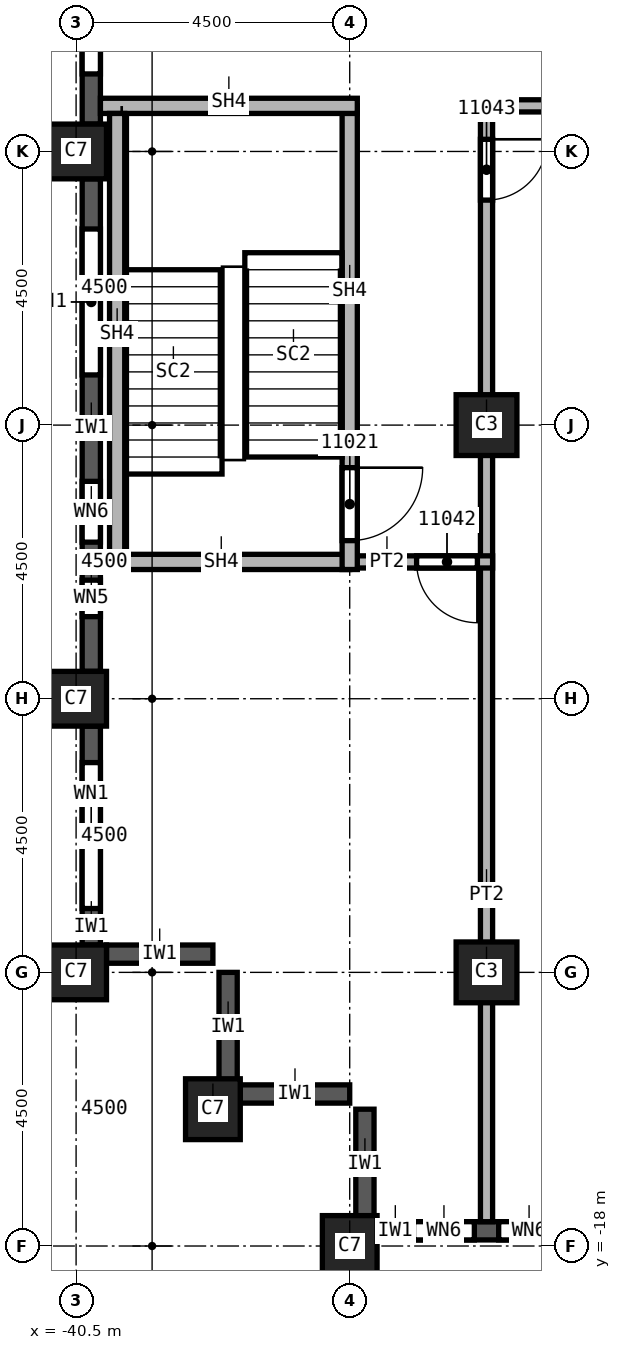
"""IFC4 building model, lengths in metres.
Left out: names, types, materials, properties, quantities, classifications, styles, units other than length and angle.
Written with IfcOpenShell. Run it as: python <this file> out.ifc"""

import sys

from ifc_helpers import new_model, si_unit, direction, frame, frame_2d, origin, origin_2d, place, context, subcontext, project, spatial, rectangle, extrude, element, fill, save


model = new_model("IFC4")
c1 = context("Model", 3, precision=1e-05, world=origin(), true_north=direction((0.0, 1.0)))
c2 = subcontext(c1, "Body", "Model", "MODEL_VIEW")
j1 = project(units=[si_unit("LENGTHUNIT", "METRE"), si_unit("PLANEANGLEUNIT", "RADIAN")], contexts=[c1])
p1 = place(None, origin())
s1 = spatial("IfcSite", under=j1, at=p1, CompositionType="ELEMENT")
p2 = place(p1, origin())
s2 = spatial("IfcBuilding", under=s1, at=p2, CompositionType="ELEMENT")
p3 = place(p2, frame((0.0, 0.0, 184.0)))
s3 = spatial("IfcBuildingStorey", under=s2, at=p3, CompositionType="ELEMENT", Elevation=184.0)
for number, where, z_axis, x_axis in (
    (1, (-40.5, 0.0, 0.0), (0.0, 0.0, 1.0), (0.0, 1.0, 0.0)),
    (2, (-40.5, -9.0, 0.0), (0.0, 0.0, 1.0), (0.0, 1.0, 0.0)),
    (3, (-40.5, -13.5, 0.0), (0.0, 0.0, 1.0), (0.0, 1.0, 0.0)),
    (4, (-38.25, -15.75, 0.0), (0.0, 0.0, 1.0), (1.0, 0.0, 0.0)),
    (5, (-36.0, -18.0, 0.0), (0.0, 0.0, 1.0), (1.0, 0.0, 0.0)),
):
    element("IfcColumn", number, at=place(p3, frame(where, z_axis=z_axis, x_axis=x_axis)), inside=s3, PredefinedType="COLUMN", context=c2, shape_type="SweptSolid", body=[
        extrude(rectangle(XDim=0.9, YDim=1.0, at=origin_2d()), origin(), (0.0, 0.0, 1.0), 3.72),
    ])
for number, where, z_axis, x_axis in (
    (6, (-33.75, -4.5, 0.0), (0.0, 0.0, 1.0), (1.0, 0.0, 0.0)),
    (7, (-33.75, -13.5, 0.0), (0.0, 0.0, 1.0), (1.0, 0.0, 0.0)),
):
    element("IfcColumn", number, at=place(p3, frame(where, z_axis=z_axis, x_axis=x_axis)), inside=s3, PredefinedType="COLUMN", context=c2, shape_type="SweptSolid", body=[
        extrude(rectangle(XDim=1.0, YDim=1.0, at=origin_2d()), origin(), (0.0, 0.0, 1.0), 3.72),
    ])
p4 = place(p3, frame((-40.0, -13.2, 0.0), z_axis=(0.0, 0.0, 1.0), x_axis=(1.0, 0.0, 0.0)))
e8 = element("IfcWall", 8, at=p4, inside=s3, PredefinedType="SOLIDWALL", context=c2, shape_type="SweptSolid", body=[
    extrude(rectangle(XDim=1.75, YDim=0.3, at=frame_2d((0.875, 0.0))), origin(), (0.0, 0.0, 1.0), 3.12),
])
for number, where, z_axis, x_axis in (
    (9, (-38.0, -15.3, 0.0), (0.0, 0.0, 1.0), (0.0, 1.0, 0.0)),
    (10, (-37.8, -15.5, 0.0), (0.0, 0.0, 1.0), (1.0, 0.0, 0.0)),
    (11, (-35.75, -17.55, 0.0), (0.0, 0.0, 1.0), (0.0, 1.0, 0.0)),
):
    element("IfcWall", number, at=place(p3, frame(where, z_axis=z_axis, x_axis=x_axis)), inside=s3, PredefinedType="SOLIDWALL", context=c2, shape_type="SweptSolid", body=[
        extrude(rectangle(XDim=1.8, YDim=0.3, at=frame_2d((0.9, 0.0))), origin(), (0.0, 0.0, 1.0), 3.12),
    ])
p5 = place(p3, frame((-40.25, 8.55, 0.0), z_axis=(0.0, 0.0, 1.0), x_axis=(0.0, -1.0, 0.0)))
e12 = element("IfcWall", 12, at=p5, inside=s3, PredefinedType="SOLIDWALL", context=c2, shape_type="SweptSolid", body=[
    extrude(rectangle(XDim=8.1, YDim=0.3, at=frame_2d((4.05, 0.0))), origin(), (0.0, 0.0, 1.0), 3.12),
])
p6 = place(p5, frame((0.825, 0.0, 0.8)))
e13 = element("IfcOpeningElement", 13, at=p6, cuts=e12, PredefinedType="OPENING", context=c2, shape_type="SweptSolid", body=[
    extrude(rectangle(XDim=2.4, YDim=1.95, at=frame_2d((1.2, 0.975))), frame((0.0, 0.15, 0.0), z_axis=(0.0, -1.0, 0.0), x_axis=(1.0, 0.0, 0.0)), (0.0, 0.0, 1.0), 0.3),
])
p7 = place(p5, frame((4.875, 0.0, 0.8)))
e14 = element("IfcOpeningElement", 14, at=p7, cuts=e12, PredefinedType="OPENING", context=c2, shape_type="SweptSolid", body=[
    extrude(rectangle(XDim=2.4, YDim=1.95, at=frame_2d((1.2, 0.975))), frame((0.0, 0.15, 0.0), z_axis=(0.0, -1.0, 0.0), x_axis=(1.0, 0.0, 0.0)), (0.0, 0.0, 1.0), 0.3),
])
p8 = place(p3, frame((-40.25, -0.45, 0.0), z_axis=(0.0, 0.0, 1.0), x_axis=(0.0, -1.0, 0.0)))
e15 = element("IfcWall", 15, at=p8, inside=s3, PredefinedType="SOLIDWALL", context=c2, shape_type="SweptSolid", body=[
    extrude(rectangle(XDim=8.1, YDim=0.3, at=frame_2d((4.05, 0.0))), origin(), (0.0, 0.0, 1.0), 3.12),
])
p9 = place(p8, frame((0.825, 0.0, 0.8)))
e16 = element("IfcOpeningElement", 16, at=p9, cuts=e15, PredefinedType="OPENING", context=c2, shape_type="SweptSolid", body=[
    extrude(rectangle(XDim=2.4, YDim=1.95, at=frame_2d((1.2, 0.975))), frame((0.0, 0.15, 0.0), z_axis=(0.0, -1.0, 0.0), x_axis=(1.0, 0.0, 0.0)), (0.0, 0.0, 1.0), 0.3),
])
p10 = place(p8, frame((4.975, 0.0, 0.8)))
e17 = element("IfcOpeningElement", 17, at=p10, cuts=e15, PredefinedType="OPENING", context=c2, shape_type="SweptSolid", body=[
    extrude(rectangle(XDim=1.0, YDim=1.95, at=frame_2d((0.5, 0.975))), frame((0.0, 0.15, 0.0), z_axis=(0.0, -1.0, 0.0), x_axis=(1.0, 0.0, 0.0)), (0.0, 0.0, 1.0), 0.3),
])
p11 = place(p8, frame((6.6, 0.0, 0.8)))
e18 = element("IfcOpeningElement", 18, at=p11, cuts=e15, PredefinedType="OPENING", context=c2, shape_type="SweptSolid", body=[
    extrude(rectangle(XDim=0.6, YDim=1.95, at=frame_2d((0.3, 0.975))), frame((0.0, 0.15, 0.0), z_axis=(0.0, -1.0, 0.0), x_axis=(1.0, 0.0, 0.0)), (0.0, 0.0, 1.0), 0.3),
])
p12 = place(p3, frame((-40.25, -9.45, 0.0), z_axis=(0.0, 0.0, 1.0), x_axis=(0.0, -1.0, 0.0)))
e19 = element("IfcWall", 19, at=p12, inside=s3, PredefinedType="SOLIDWALL", context=c2, shape_type="SweptSolid", body=[
    extrude(rectangle(XDim=3.6, YDim=0.3, at=frame_2d((1.8, 0.0))), origin(), (0.0, 0.0, 1.0), 3.12),
])
p13 = place(p12, frame((0.6, 0.0, 0.8)))
e20 = element("IfcOpeningElement", 20, at=p13, cuts=e19, PredefinedType="OPENING", context=c2, shape_type="SweptSolid", body=[
    extrude(rectangle(XDim=2.4, YDim=1.95, at=frame_2d((1.2, 0.975))), frame((0.0, 0.15, 0.0), z_axis=(0.0, -1.0, 0.0), x_axis=(1.0, 0.0, 0.0)), (0.0, 0.0, 1.0), 0.3),
])
p14 = place(p3, frame((-35.55, -17.75, 0.0), z_axis=(0.0, 0.0, 1.0), x_axis=(1.0, 0.0, 0.0)))
e21 = element("IfcWall", 21, at=p14, inside=s3, PredefinedType="SOLIDWALL", context=c2, shape_type="SweptSolid", body=[
    extrude(rectangle(XDim=3.6, YDim=0.3, at=frame_2d((1.8, 0.0))), origin(), (0.0, 0.0, 1.0), 3.12),
])
p15 = place(p14, frame((0.6, 0.0, 0.8)))
e22 = element("IfcOpeningElement", 22, at=p15, cuts=e21, PredefinedType="OPENING", context=c2, shape_type="SweptSolid", body=[
    extrude(rectangle(XDim=1.0, YDim=1.95, at=frame_2d((0.5, 0.975))), frame((0.0, 0.15, 0.0), z_axis=(0.0, -1.0, 0.0), x_axis=(1.0, 0.0, 0.0)), (0.0, 0.0, 1.0), 0.3),
])
p16 = place(p14, frame((2.0, 0.0, 0.8)))
e23 = element("IfcOpeningElement", 23, at=p16, cuts=e21, PredefinedType="OPENING", context=c2, shape_type="SweptSolid", body=[
    extrude(rectangle(XDim=1.0, YDim=1.95, at=frame_2d((0.5, 0.975))), frame((0.0, 0.15, 0.0), z_axis=(0.0, -1.0, 0.0), x_axis=(1.0, 0.0, 0.0)), (0.0, 0.0, 1.0), 0.3),
])
p17 = place(p3, frame((-33.75, 0.75, 0.0), z_axis=(0.0, 0.0, 1.0), x_axis=(0.0, -1.0, 0.0)))
e24 = element("IfcWall", 24, at=p17, inside=s3, PredefinedType="PARTITIONING", context=c2, shape_type="SweptSolid", body=[
    extrude(rectangle(XDim=18.35, YDim=0.2, at=frame_2d((9.175, 0.0))), origin(), (0.0, 0.0, 1.0), 3.72),
])
p18 = place(p17, frame((0.55, 0.0, 0.0)))
e25 = element("IfcOpeningElement", 25, at=p18, cuts=e24, PredefinedType="OPENING", context=c2, shape_type="SweptSolid", body=[
    extrude(rectangle(XDim=1.0, YDim=2.1, at=frame_2d((0.5, 1.05))), frame((0.0, 0.1, 0.0), z_axis=(0.0, -1.0, 0.0), x_axis=(1.0, 0.0, 0.0)), (0.0, 0.0, 1.0), 0.2),
])
p19 = place(p3, frame((-33.65, -6.75, 0.0), z_axis=(0.0, 0.0, 1.0), x_axis=(-1.0, 0.0, 0.0)))
e26 = element("IfcWall", 26, at=p19, inside=s3, PredefinedType="PARTITIONING", context=c2, shape_type="SweptSolid", body=[
    extrude(rectangle(XDim=2.35, YDim=0.2, at=frame_2d((1.175, 0.0))), origin(), (0.0, 0.0, 1.0), 3.72),
])
p20 = place(p19, frame((0.25, 0.0, 0.0)))
e27 = element("IfcOpeningElement", 27, at=p20, cuts=e26, PredefinedType="OPENING", context=c2, shape_type="SweptSolid", body=[
    extrude(rectangle(XDim=1.0, YDim=2.1, at=frame_2d((0.5, 1.05))), frame((0.0, 0.1, 0.0), z_axis=(0.0, -1.0, 0.0), x_axis=(1.0, 0.0, 0.0)), (0.0, 0.0, 1.0), 0.2),
])
p21 = place(p3, frame((-19.9, 0.75, 0.0), z_axis=(0.0, 0.0, 1.0), x_axis=(-1.0, 0.0, 0.0)))
e28 = element("IfcWall", 28, at=p21, inside=s3, PredefinedType="PARTITIONING", context=c2, shape_type="SweptSolid", body=[
    extrude(rectangle(XDim=13.95, YDim=0.2, at=frame_2d((6.975, 0.0))), origin(), (0.0, 0.0, 1.0), 3.72),
])
p22 = place(p3, frame((-36.0, -6.75, 0.0), z_axis=(0.0, 0.0, 1.0), x_axis=(-1.0, 0.0, 0.0)))
e29 = element("IfcWall", 29, at=p22, inside=s3, PredefinedType="SOLIDWALL", context=c2, shape_type="SweptSolid", body=[
    extrude(rectangle(XDim=4.1, YDim=0.25, at=frame_2d((2.05, 0.0))), origin(), (0.0, 0.0, 1.0), 3.72),
])
p23 = place(p3, frame((-36.0, 0.75, 0.0), z_axis=(0.0, 0.0, 1.0), x_axis=(0.0, -1.0, 0.0)))
e30 = element("IfcWall", 30, at=p23, inside=s3, PredefinedType="SOLIDWALL", context=c2, shape_type="SweptSolid", body=[
    extrude(rectangle(XDim=7.625, YDim=0.25, at=frame_2d((3.812, 0.0))), origin(), (0.0, 0.0, 1.0), 3.72),
])
p24 = place(p23, frame((5.95, 0.0, 0.0)))
e31 = element("IfcOpeningElement", 31, at=p24, cuts=e30, PredefinedType="OPENING", context=c2, shape_type="SweptSolid", body=[
    extrude(rectangle(XDim=1.2, YDim=2.1, at=frame_2d((0.6, 1.05))), frame((0.0, 0.125, 0.0), z_axis=(0.0, -1.0, 0.0), x_axis=(1.0, 0.0, 0.0)), (0.0, 0.0, 1.0), 0.25),
])
p25 = place(p3, frame((-35.875, 0.75, 0.0), z_axis=(0.0, 0.0, 1.0), x_axis=(-1.0, 0.0, 0.0)))
e32 = element("IfcWall", 32, at=p25, inside=s3, PredefinedType="SOLIDWALL", context=c2, shape_type="SweptSolid", body=[
    extrude(rectangle(XDim=4.225, YDim=0.25, at=frame_2d((2.113, 0.0))), origin(), (0.0, 0.0, 1.0), 3.72),
])
p26 = place(p3, frame((-39.825, -6.625, 0.0), z_axis=(0.0, 0.0, 1.0), x_axis=(0.0, 1.0, 0.0)))
e33 = element("IfcWall", 33, at=p26, inside=s3, PredefinedType="SOLIDWALL", context=c2, shape_type="SweptSolid", body=[
    extrude(rectangle(XDim=7.25, YDim=0.25, at=frame_2d((3.625, 0.0))), origin(), (0.0, 0.0, 1.0), 3.72),
])
p27 = place(p7, origin())
e34 = element("IfcWindow", 34, at=p27, inside=s3, PartitioningType="SINGLE_PANEL", PredefinedType="WINDOW", context=c2, shape_type="SweptSolid", body=[
    extrude(rectangle(XDim=2.4, YDim=1.95, at=frame_2d((1.2, 0.975))), frame((0.0, 0.03, 0.0), z_axis=(0.0, -1.0, 0.0), x_axis=(1.0, 0.0, 0.0)), (0.0, 0.0, 1.0), 0.06),
])
fill(e14, e34)
p28 = place(p9, origin())
e35 = element("IfcWindow", 35, at=p28, inside=s3, PartitioningType="SINGLE_PANEL", PredefinedType="WINDOW", context=c2, shape_type="SweptSolid", body=[
    extrude(rectangle(XDim=2.4, YDim=1.95, at=frame_2d((1.2, 0.975))), frame((0.0, 0.03, 0.0), z_axis=(0.0, -1.0, 0.0), x_axis=(1.0, 0.0, 0.0)), (0.0, 0.0, 1.0), 0.06),
])
fill(e16, e35)
p29 = place(p13, origin())
e36 = element("IfcWindow", 36, at=p29, inside=s3, PartitioningType="SINGLE_PANEL", PredefinedType="WINDOW", context=c2, shape_type="SweptSolid", body=[
    extrude(rectangle(XDim=2.4, YDim=1.95, at=frame_2d((1.2, 0.975))), frame((0.0, 0.03, 0.0), z_axis=(0.0, -1.0, 0.0), x_axis=(1.0, 0.0, 0.0)), (0.0, 0.0, 1.0), 0.06),
])
fill(e20, e36)
p30 = place(p24, origin())
e37 = element("IfcDoor", 37, at=p30, inside=s3, OperationType="SINGLE_SWING_RIGHT", PredefinedType="DOOR", context=c2, shape_type="SweptSolid", body=[
    extrude(rectangle(XDim=1.2, YDim=2.1, at=frame_2d((0.6, 1.05))), frame((0.0, 0.025, 0.0), z_axis=(0.0, -1.0, 0.0), x_axis=(1.0, 0.0, 0.0)), (0.0, 0.0, 1.0), 0.05),
])
fill(e31, e37)
p31 = place(p20, origin())
e38 = element("IfcDoor", 38, at=p31, inside=s3, OperationType="SINGLE_SWING_LEFT", PredefinedType="DOOR", context=c2, shape_type="SweptSolid", body=[
    extrude(rectangle(XDim=1.0, YDim=2.1, at=frame_2d((0.5, 1.05))), frame((0.0, 0.025, 0.0), z_axis=(0.0, -1.0, 0.0), x_axis=(1.0, 0.0, 0.0)), (0.0, 0.0, 1.0), 0.05),
])
fill(e27, e38)
p32 = place(p18, origin())
e39 = element("IfcDoor", 39, at=p32, inside=s3, OperationType="SINGLE_SWING_RIGHT", PredefinedType="DOOR", context=c2, shape_type="SweptSolid", body=[
    extrude(rectangle(XDim=1.0, YDim=2.1, at=frame_2d((0.5, 1.05))), frame((0.0, 0.025, 0.0), z_axis=(0.0, -1.0, 0.0), x_axis=(1.0, 0.0, 0.0)), (0.0, 0.0, 1.0), 0.05),
])
fill(e25, e39)
p33 = place(p10, origin())
e40 = element("IfcWindow", 40, at=p33, inside=s3, PartitioningType="SINGLE_PANEL", PredefinedType="WINDOW", context=c2, shape_type="SweptSolid", body=[
    extrude(rectangle(XDim=1.0, YDim=1.95, at=frame_2d((0.5, 0.975))), frame((0.0, 0.03, 0.0), z_axis=(0.0, -1.0, 0.0), x_axis=(1.0, 0.0, 0.0)), (0.0, 0.0, 1.0), 0.06),
])
fill(e17, e40)
p34 = place(p11, origin())
e41 = element("IfcWindow", 41, at=p34, inside=s3, PartitioningType="SINGLE_PANEL", PredefinedType="WINDOW", context=c2, shape_type="SweptSolid", body=[
    extrude(rectangle(XDim=0.6, YDim=1.95, at=frame_2d((0.3, 0.975))), frame((0.0, 0.03, 0.0), z_axis=(0.0, -1.0, 0.0), x_axis=(1.0, 0.0, 0.0)), (0.0, 0.0, 1.0), 0.06),
])
fill(e18, e41)
p35 = place(p15, origin())
e42 = element("IfcWindow", 42, at=p35, inside=s3, PartitioningType="SINGLE_PANEL", PredefinedType="WINDOW", context=c2, shape_type="SweptSolid", body=[
    extrude(rectangle(XDim=1.0, YDim=1.95, at=frame_2d((0.5, 0.975))), frame((0.0, 0.03, 0.0), z_axis=(0.0, -1.0, 0.0), x_axis=(1.0, 0.0, 0.0)), (0.0, 0.0, 1.0), 0.06),
])
fill(e22, e42)
p36 = place(p16, origin())
e43 = element("IfcWindow", 43, at=p36, inside=s3, PartitioningType="SINGLE_PANEL", PredefinedType="WINDOW", context=c2, shape_type="SweptSolid", body=[
    extrude(rectangle(XDim=1.0, YDim=1.95, at=frame_2d((0.5, 0.975))), frame((0.0, 0.03, 0.0), z_axis=(0.0, -1.0, 0.0), x_axis=(1.0, 0.0, 0.0)), (0.0, 0.0, 1.0), 0.06),
])
fill(e23, e43)
save(model, sys.argv[1])
